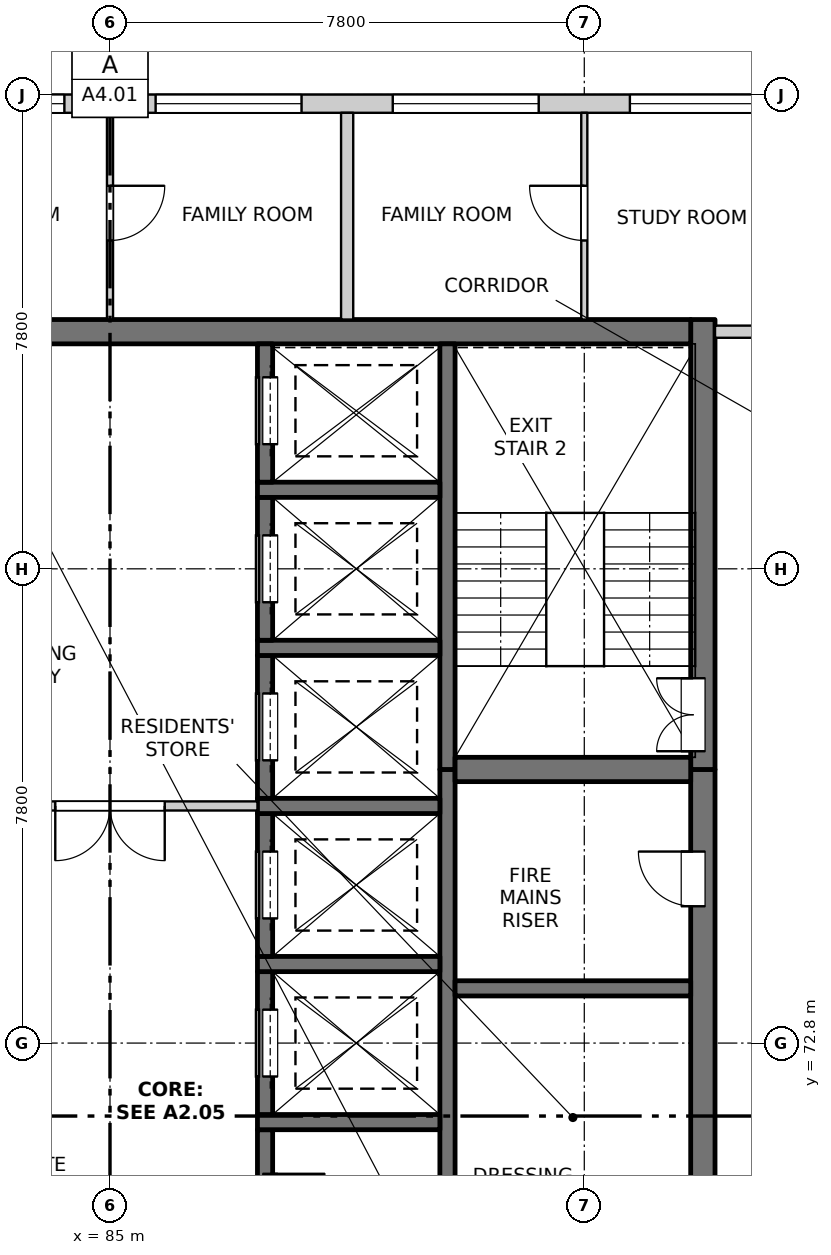
"""IFC4 building model, lengths in metres.
Left out: names, types, materials, properties, quantities, classifications, styles, units other than length and angle.
Written with IfcOpenShell. Run it as: python <this file> out.ifc"""

import sys

from ifc_helpers import new_model, si_unit, direction, frame, frame_2d, origin, place, context, subcontext, project, spatial, rectangle, extrude, element, fill, save


model = new_model("IFC4")
c1 = context("Model", 3, precision=1e-05, world=origin(), true_north=direction((0.0, 1.0)))
c2 = subcontext(c1, "Body", "Model", "MODEL_VIEW")
j1 = project(units=[si_unit("LENGTHUNIT", "METRE"), si_unit("PLANEANGLEUNIT", "RADIAN")], contexts=[c1])
p1 = place(None, origin())
s1 = spatial("IfcSite", under=j1, at=p1, CompositionType="ELEMENT")
p2 = place(p1, origin())
s2 = spatial("IfcBuilding", under=s1, at=p2, CompositionType="ELEMENT")
p3 = place(p2, frame((0.0, 0.0, 231.3)))
s3 = spatial("IfcBuildingStorey", under=s2, at=p3, CompositionType="ELEMENT", Elevation=231.3)
p4 = place(p3, frame((94.75, 61.95, -0.25), z_axis=(0.0, 0.0, 1.0), x_axis=(0.0, 1.0, 0.0)))
e1 = element("IfcWall", 1, at=p4, inside=s3, PredefinedType="SOLIDWALL", context=c2, shape_type="SweptSolid", body=[
    extrude(rectangle(XDim=15.35, YDim=0.4, at=frame_2d((7.675, 0.0))), origin(), (0.0, 0.0, 1.0), 3.4),
])
p5 = place(p4, frame((0.925, 0.0, 0.25)))
e2 = element("IfcOpeningElement", 2, at=p5, cuts=e1, PredefinedType="OPENING", context=c2, shape_type="SweptSolid", body=[
    extrude(rectangle(XDim=0.9, YDim=2.1, at=frame_2d((0.45, 1.05))), frame((0.0, 0.21, 0.0), z_axis=(0.0, -1.0, 0.0), x_axis=(1.0, 0.0, 0.0)), (0.0, 0.0, 1.0), 0.42),
])
p6 = place(p4, frame((6.8, 0.0, 0.25)))
e3 = element("IfcOpeningElement", 3, at=p6, cuts=e1, PredefinedType="OPENING", context=c2, shape_type="SweptSolid", body=[
    extrude(rectangle(XDim=0.9, YDim=2.1, at=frame_2d((0.45, 1.05))), frame((0.0, 0.21, 0.0), z_axis=(0.0, -1.0, 0.0), x_axis=(1.0, 0.0, 0.0)), (0.0, 0.0, 1.0), 0.42),
])
p7 = place(p4, frame((13.1, 0.0, 0.25)))
e4 = element("IfcOpeningElement", 4, at=p7, cuts=e1, PredefinedType="OPENING", context=c2, shape_type="SweptSolid", body=[
    extrude(rectangle(XDim=0.9, YDim=2.1, at=frame_2d((0.45, 1.05))), frame((0.0, 0.21, 0.0), z_axis=(0.0, -1.0, 0.0), x_axis=(1.0, 0.0, 0.0)), (0.0, 0.0, 1.0), 0.42),
])
p8 = place(p3, frame((94.75, 77.3, -0.25), z_axis=(0.0, 0.0, 1.0), x_axis=(0.0, 1.0, 0.0)))
e5 = element("IfcWall", 5, at=p8, inside=s3, PredefinedType="SOLIDWALL", context=c2, shape_type="SweptSolid", body=[
    extrude(rectangle(XDim=7.4, YDim=0.4, at=frame_2d((3.7, 0.0))), origin(), (0.0, 0.0, 1.0), 3.4),
])
p9 = place(p8, frame((0.3, 0.0, 0.25)))
e6 = element("IfcOpeningElement", 6, at=p9, cuts=e5, PredefinedType="OPENING", context=c2, shape_type="SweptSolid", body=[
    extrude(rectangle(XDim=1.2, YDim=2.1, at=frame_2d((0.6, 1.05))), frame((0.0, 0.21, 0.0), z_axis=(0.0, -1.0, 0.0), x_axis=(1.0, 0.0, 0.0)), (0.0, 0.0, 1.0), 0.42),
])
p10 = place(p3, frame((75.45, 84.5, -0.25), z_axis=(0.0, 0.0, 1.0), x_axis=(1.0, 0.0, 0.0)))
e7 = element("IfcWall", 7, at=p10, inside=s3, PredefinedType="SOLIDWALL", context=c2, shape_type="SweptSolid", body=[
    extrude(rectangle(XDim=19.1, YDim=0.4, at=frame_2d((9.55, 0.0))), origin(), (0.0, 0.0, 1.0), 3.4),
])
p11 = place(p3, frame((90.55, 61.95, -0.25), z_axis=(0.0, 0.0, 1.0), x_axis=(0.0, 1.0, 0.0)))
e8 = element("IfcWall", 8, at=p11, inside=s3, PredefinedType="SOLIDWALL", context=c2, shape_type="SweptSolid", body=[
    extrude(rectangle(XDim=15.35, YDim=0.25, at=frame_2d((7.675, 0.0))), origin(), (0.0, 0.0, 1.0), 3.4),
])
p12 = place(p3, frame((90.55, 77.3, -0.25), z_axis=(0.0, 0.0, 1.0), x_axis=(0.0, 1.0, 0.0)))
e9 = element("IfcWall", 9, at=p12, inside=s3, PredefinedType="SOLIDWALL", context=c2, shape_type="SweptSolid", body=[
    extrude(rectangle(XDim=7.0, YDim=0.25, at=frame_2d((3.5, 0.0))), origin(), (0.0, 0.0, 1.0), 3.4),
])
p13 = place(p3, frame((87.55, 69.025, -0.25), z_axis=(0.0, 0.0, 1.0), x_axis=(0.0, 1.0, 0.0)))
e10 = element("IfcWall", 10, at=p13, inside=s3, PredefinedType="SOLIDWALL", context=c2, shape_type="SweptSolid", body=[
    extrude(rectangle(XDim=2.35, YDim=0.25, at=frame_2d((1.175, 0.0))), origin(), (0.0, 0.0, 1.0), 3.4),
])
p14 = place(p13, frame((0.725, 0.0, 0.25)))
e11 = element("IfcOpeningElement", 11, at=p14, cuts=e10, PredefinedType="OPENING", context=c2, shape_type="SweptSolid", body=[
    extrude(rectangle(XDim=0.9, YDim=2.1, at=frame_2d((0.45, 1.05))), frame((0.0, 0.135, 0.0), z_axis=(0.0, -1.0, 0.0), x_axis=(1.0, 0.0, 0.0)), (0.0, 0.0, 1.0), 0.27),
])
p15 = place(p3, frame((87.425, 71.5, -0.25), z_axis=(0.0, 0.0, 1.0), x_axis=(1.0, 0.0, 0.0)))
e12 = element("IfcWall", 12, at=p15, inside=s3, PredefinedType="SOLIDWALL", context=c2, shape_type="SweptSolid", body=[
    extrude(rectangle(XDim=3.0, YDim=0.25, at=frame_2d((1.5, 0.0))), origin(), (0.0, 0.0, 1.0), 3.4),
])
p16 = place(p3, frame((87.55, 71.625, -0.25), z_axis=(0.0, 0.0, 1.0), x_axis=(0.0, 1.0, 0.0)))
e13 = element("IfcWall", 13, at=p16, inside=s3, PredefinedType="SOLIDWALL", context=c2, shape_type="SweptSolid", body=[
    extrude(rectangle(XDim=2.35, YDim=0.25, at=frame_2d((1.175, 0.0))), origin(), (0.0, 0.0, 1.0), 3.4),
])
p17 = place(p16, frame((0.625, 0.0, 0.25)))
e14 = element("IfcOpeningElement", 14, at=p17, cuts=e13, PredefinedType="OPENING", context=c2, shape_type="SweptSolid", body=[
    extrude(rectangle(XDim=1.1, YDim=2.1, at=frame_2d((0.55, 1.05))), frame((0.0, 0.135, 0.0), z_axis=(0.0, -1.0, 0.0), x_axis=(1.0, 0.0, 0.0)), (0.0, 0.0, 1.0), 0.27),
])
p18 = place(p3, frame((87.425, 74.1, -0.25), z_axis=(0.0, 0.0, 1.0), x_axis=(1.0, 0.0, 0.0)))
e15 = element("IfcWall", 15, at=p18, inside=s3, PredefinedType="SOLIDWALL", context=c2, shape_type="SweptSolid", body=[
    extrude(rectangle(XDim=3.0, YDim=0.25, at=frame_2d((1.5, 0.0))), origin(), (0.0, 0.0, 1.0), 3.4),
])
p19 = place(p3, frame((87.55, 74.225, -0.25), z_axis=(0.0, 0.0, 1.0), x_axis=(0.0, 1.0, 0.0)))
e16 = element("IfcWall", 16, at=p19, inside=s3, PredefinedType="SOLIDWALL", context=c2, shape_type="SweptSolid", body=[
    extrude(rectangle(XDim=2.35, YDim=0.25, at=frame_2d((1.175, 0.0))), origin(), (0.0, 0.0, 1.0), 3.4),
])
p20 = place(p19, frame((0.625, 0.0, 0.25)))
e17 = element("IfcOpeningElement", 17, at=p20, cuts=e16, PredefinedType="OPENING", context=c2, shape_type="SweptSolid", body=[
    extrude(rectangle(XDim=1.1, YDim=2.1, at=frame_2d((0.55, 1.05))), frame((0.0, 0.135, 0.0), z_axis=(0.0, -1.0, 0.0), x_axis=(1.0, 0.0, 0.0)), (0.0, 0.0, 1.0), 0.27),
])
p21 = place(p3, frame((87.425, 76.7, -0.25), z_axis=(0.0, 0.0, 1.0), x_axis=(1.0, 0.0, 0.0)))
e18 = element("IfcWall", 18, at=p21, inside=s3, PredefinedType="SOLIDWALL", context=c2, shape_type="SweptSolid", body=[
    extrude(rectangle(XDim=3.0, YDim=0.25, at=frame_2d((1.5, 0.0))), origin(), (0.0, 0.0, 1.0), 3.4),
])
p22 = place(p3, frame((87.55, 76.825, -0.25), z_axis=(0.0, 0.0, 1.0), x_axis=(0.0, 1.0, 0.0)))
e19 = element("IfcWall", 19, at=p22, inside=s3, PredefinedType="SOLIDWALL", context=c2, shape_type="SweptSolid", body=[
    extrude(rectangle(XDim=2.35, YDim=0.25, at=frame_2d((1.175, 0.0))), origin(), (0.0, 0.0, 1.0), 3.4),
])
p23 = place(p22, frame((0.625, 0.0, 0.25)))
e20 = element("IfcOpeningElement", 20, at=p23, cuts=e19, PredefinedType="OPENING", context=c2, shape_type="SweptSolid", body=[
    extrude(rectangle(XDim=1.1, YDim=2.1, at=frame_2d((0.55, 1.05))), frame((0.0, 0.135, 0.0), z_axis=(0.0, -1.0, 0.0), x_axis=(1.0, 0.0, 0.0)), (0.0, 0.0, 1.0), 0.27),
])
p24 = place(p3, frame((87.425, 79.3, -0.25), z_axis=(0.0, 0.0, 1.0), x_axis=(1.0, 0.0, 0.0)))
e21 = element("IfcWall", 21, at=p24, inside=s3, PredefinedType="SOLIDWALL", context=c2, shape_type="SweptSolid", body=[
    extrude(rectangle(XDim=3.0, YDim=0.25, at=frame_2d((1.5, 0.0))), origin(), (0.0, 0.0, 1.0), 3.4),
])
p25 = place(p3, frame((87.55, 79.425, -0.25), z_axis=(0.0, 0.0, 1.0), x_axis=(0.0, 1.0, 0.0)))
e22 = element("IfcWall", 22, at=p25, inside=s3, PredefinedType="SOLIDWALL", context=c2, shape_type="SweptSolid", body=[
    extrude(rectangle(XDim=2.35, YDim=0.25, at=frame_2d((1.175, 0.0))), origin(), (0.0, 0.0, 1.0), 3.4),
])
p26 = place(p25, frame((0.625, 0.0, 0.25)))
e23 = element("IfcOpeningElement", 23, at=p26, cuts=e22, PredefinedType="OPENING", context=c2, shape_type="SweptSolid", body=[
    extrude(rectangle(XDim=1.1, YDim=2.1, at=frame_2d((0.55, 1.05))), frame((0.0, 0.135, 0.0), z_axis=(0.0, -1.0, 0.0), x_axis=(1.0, 0.0, 0.0)), (0.0, 0.0, 1.0), 0.27),
])
p27 = place(p3, frame((87.425, 81.9, -0.25), z_axis=(0.0, 0.0, 1.0), x_axis=(1.0, 0.0, 0.0)))
e24 = element("IfcWall", 24, at=p27, inside=s3, PredefinedType="SOLIDWALL", context=c2, shape_type="SweptSolid", body=[
    extrude(rectangle(XDim=3.0, YDim=0.25, at=frame_2d((1.5, 0.0))), origin(), (0.0, 0.0, 1.0), 3.4),
])
p28 = place(p3, frame((87.55, 82.025, -0.25), z_axis=(0.0, 0.0, 1.0), x_axis=(0.0, 1.0, 0.0)))
e25 = element("IfcWall", 25, at=p28, inside=s3, PredefinedType="SOLIDWALL", context=c2, shape_type="SweptSolid", body=[
    extrude(rectangle(XDim=2.275, YDim=0.25, at=frame_2d((1.138, 0.0))), origin(), (0.0, 0.0, 1.0), 3.4),
])
p29 = place(p28, frame((0.625, 0.0, 0.25)))
e26 = element("IfcOpeningElement", 26, at=p29, cuts=e25, PredefinedType="OPENING", context=c2, shape_type="SweptSolid", body=[
    extrude(rectangle(XDim=1.1, YDim=2.1, at=frame_2d((0.55, 1.05))), frame((0.0, 0.135, 0.0), z_axis=(0.0, -1.0, 0.0), x_axis=(1.0, 0.0, 0.0)), (0.0, 0.0, 1.0), 0.27),
])
p30 = place(p3, frame((90.675, 73.7, -0.25), z_axis=(0.0, 0.0, 1.0), x_axis=(1.0, 0.0, 0.0)))
e27 = element("IfcWall", 27, at=p30, inside=s3, PredefinedType="SOLIDWALL", context=c2, shape_type="SweptSolid", body=[
    extrude(rectangle(XDim=3.875, YDim=0.25, at=frame_2d((1.938, 0.0))), origin(), (0.0, 0.0, 1.0), 3.4),
])
p31 = place(p3, frame((90.675, 77.3, -0.25), z_axis=(0.0, 0.0, 1.0), x_axis=(1.0, 0.0, 0.0)))
e28 = element("IfcWall", 28, at=p31, inside=s3, PredefinedType="SOLIDWALL", context=c2, shape_type="SweptSolid", body=[
    extrude(rectangle(XDim=3.875, YDim=0.4, at=frame_2d((1.938, 0.0))), origin(), (0.0, 0.0, 1.0), 3.4),
])
p32 = place(p3, frame((73.7, 88.25, 0.0), z_axis=(0.0, 0.0, 1.0), x_axis=(1.0, 0.0, 0.0)))
e29 = element("IfcWall", 29, at=p32, inside=s3, PredefinedType="SOLIDWALL", context=c2, shape_type="SweptSolid", body=[
    extrude(rectangle(XDim=22.6, YDim=0.3, at=frame_2d((11.3, 0.0))), origin(), (0.0, 0.0, 1.0), 2.7),
])
p33 = place(p32, frame((0.35, 0.0, 0.9)))
e30 = element("IfcOpeningElement", 30, at=p33, cuts=e29, PredefinedType="OPENING", context=c2, shape_type="SweptSolid", body=[
    extrude(rectangle(XDim=2.4, YDim=1.8, at=frame_2d((1.2, 0.9))), frame((0.0, 0.16, 0.0), z_axis=(0.0, -1.0, 0.0), x_axis=(1.0, 0.0, 0.0)), (0.0, 0.0, 1.0), 0.32),
])
p34 = place(p32, frame((4.25, 0.0, 0.9)))
e31 = element("IfcOpeningElement", 31, at=p34, cuts=e29, PredefinedType="OPENING", context=c2, shape_type="SweptSolid", body=[
    extrude(rectangle(XDim=2.4, YDim=1.8, at=frame_2d((1.2, 0.9))), frame((0.0, 0.16, 0.0), z_axis=(0.0, -1.0, 0.0), x_axis=(1.0, 0.0, 0.0)), (0.0, 0.0, 1.0), 0.32),
])
p35 = place(p32, frame((8.15, 0.0, 0.9)))
e32 = element("IfcOpeningElement", 32, at=p35, cuts=e29, PredefinedType="OPENING", context=c2, shape_type="SweptSolid", body=[
    extrude(rectangle(XDim=2.4, YDim=1.8, at=frame_2d((1.2, 0.9))), frame((0.0, 0.16, 0.0), z_axis=(0.0, -1.0, 0.0), x_axis=(1.0, 0.0, 0.0)), (0.0, 0.0, 1.0), 0.32),
])
p36 = place(p32, frame((12.05, 0.0, 0.9)))
e33 = element("IfcOpeningElement", 33, at=p36, cuts=e29, PredefinedType="OPENING", context=c2, shape_type="SweptSolid", body=[
    extrude(rectangle(XDim=2.4, YDim=1.8, at=frame_2d((1.2, 0.9))), frame((0.0, 0.16, 0.0), z_axis=(0.0, -1.0, 0.0), x_axis=(1.0, 0.0, 0.0)), (0.0, 0.0, 1.0), 0.32),
])
p37 = place(p32, frame((15.95, 0.0, 0.9)))
e34 = element("IfcOpeningElement", 34, at=p37, cuts=e29, PredefinedType="OPENING", context=c2, shape_type="SweptSolid", body=[
    extrude(rectangle(XDim=2.4, YDim=1.8, at=frame_2d((1.2, 0.9))), frame((0.0, 0.16, 0.0), z_axis=(0.0, -1.0, 0.0), x_axis=(1.0, 0.0, 0.0)), (0.0, 0.0, 1.0), 0.32),
])
p38 = place(p32, frame((19.85, 0.0, 0.9)))
e35 = element("IfcOpeningElement", 35, at=p38, cuts=e29, PredefinedType="OPENING", context=c2, shape_type="SweptSolid", body=[
    extrude(rectangle(XDim=2.4, YDim=1.8, at=frame_2d((1.2, 0.9))), frame((0.0, 0.16, 0.0), z_axis=(0.0, -1.0, 0.0), x_axis=(1.0, 0.0, 0.0)), (0.0, 0.0, 1.0), 0.32),
])
p39 = place(p3, frame((82.575, 76.7, 0.0), z_axis=(0.0, 0.0, 1.0), x_axis=(1.0, 0.0, 0.0)))
e36 = element("IfcWall", 36, at=p39, inside=s3, PredefinedType="PARTITIONING", context=c2, shape_type="SweptSolid", body=[
    extrude(rectangle(XDim=4.85, YDim=0.15, at=frame_2d((2.425, 0.0))), origin(), (0.0, 0.0, 1.0), 3.15),
])
p40 = place(p39, frame((1.525, 0.0, 0.0)))
e37 = element("IfcOpeningElement", 37, at=p40, cuts=e36, PredefinedType="OPENING", context=c2, shape_type="SweptSolid", body=[
    extrude(rectangle(XDim=1.8, YDim=2.1, at=frame_2d((0.9, 1.05))), frame((0.0, 0.085, 0.0), z_axis=(0.0, -1.0, 0.0), x_axis=(1.0, 0.0, 0.0)), (0.0, 0.0, 1.0), 0.17),
])
p41 = place(p3, frame((94.95, 84.5, 0.0), z_axis=(0.0, 0.0, 1.0), x_axis=(1.0, 0.0, 0.0)))
e38 = element("IfcWall", 38, at=p41, inside=s3, PredefinedType="PARTITIONING", context=c2, shape_type="SweptSolid", body=[
    extrude(rectangle(XDim=1.85, YDim=0.2, at=frame_2d((0.925, 0.0))), origin(), (0.0, 0.0, 1.0), 3.15),
])
p42 = place(p3, frame((85.0, 84.7, 0.0), z_axis=(0.0, 0.0, 1.0), x_axis=(0.0, 1.0, 0.0)))
e39 = element("IfcWall", 39, at=p42, inside=s3, PredefinedType="PARTITIONING", context=c2, shape_type="SweptSolid", body=[
    extrude(rectangle(XDim=3.4, YDim=0.1, at=frame_2d((1.7, 0.0))), origin(), (0.0, 0.0, 1.0), 3.15),
])
p43 = place(p42, frame((1.3, 0.0, 0.0)))
e40 = element("IfcOpeningElement", 40, at=p43, cuts=e39, PredefinedType="OPENING", context=c2, shape_type="SweptSolid", body=[
    extrude(rectangle(XDim=0.9, YDim=2.1, at=frame_2d((0.45, 1.05))), frame((0.0, 0.06, 0.0), z_axis=(0.0, -1.0, 0.0), x_axis=(1.0, 0.0, 0.0)), (0.0, 0.0, 1.0), 0.12),
])
p44 = place(p3, frame((88.9, 84.7, 0.0), z_axis=(0.0, 0.0, 1.0), x_axis=(0.0, 1.0, 0.0)))
e41 = element("IfcWall", 41, at=p44, inside=s3, PredefinedType="PARTITIONING", context=c2, shape_type="SweptSolid", body=[
    extrude(rectangle(XDim=3.4, YDim=0.2, at=frame_2d((1.7, 0.0))), origin(), (0.0, 0.0, 1.0), 3.15),
])
p45 = place(p3, frame((92.8, 84.7, 0.0), z_axis=(0.0, 0.0, 1.0), x_axis=(0.0, 1.0, 0.0)))
e42 = element("IfcWall", 42, at=p45, inside=s3, PredefinedType="PARTITIONING", context=c2, shape_type="SweptSolid", body=[
    extrude(rectangle(XDim=3.4, YDim=0.1, at=frame_2d((1.7, 0.0))), origin(), (0.0, 0.0, 1.0), 3.15),
])
p46 = place(p45, frame((1.3, 0.0, 0.0)))
e43 = element("IfcOpeningElement", 43, at=p46, cuts=e42, PredefinedType="OPENING", context=c2, shape_type="SweptSolid", body=[
    extrude(rectangle(XDim=0.9, YDim=2.1, at=frame_2d((0.45, 1.05))), frame((0.0, 0.06, 0.0), z_axis=(0.0, -1.0, 0.0), x_axis=(1.0, 0.0, 0.0)), (0.0, 0.0, 1.0), 0.12),
])
p47 = place(p35, origin())
e44 = element("IfcWindow", 44, at=p47, inside=s3, PartitioningType="DOUBLE_PANEL_VERTICAL", PredefinedType="WINDOW", context=c2, shape_type="SweptSolid", body=[
    extrude(rectangle(XDim=2.4, YDim=1.8, at=frame_2d((1.2, 0.9))), frame((0.0, 0.03, 0.0), z_axis=(0.0, -1.0, 0.0), x_axis=(1.0, 0.0, 0.0)), (0.0, 0.0, 1.0), 0.06),
])
fill(e32, e44)
p48 = place(p36, origin())
e45 = element("IfcWindow", 45, at=p48, inside=s3, PartitioningType="DOUBLE_PANEL_VERTICAL", PredefinedType="WINDOW", context=c2, shape_type="SweptSolid", body=[
    extrude(rectangle(XDim=2.4, YDim=1.8, at=frame_2d((1.2, 0.9))), frame((0.0, 0.03, 0.0), z_axis=(0.0, -1.0, 0.0), x_axis=(1.0, 0.0, 0.0)), (0.0, 0.0, 1.0), 0.06),
])
fill(e33, e45)
p49 = place(p37, origin())
e46 = element("IfcWindow", 46, at=p49, inside=s3, PartitioningType="DOUBLE_PANEL_VERTICAL", PredefinedType="WINDOW", context=c2, shape_type="SweptSolid", body=[
    extrude(rectangle(XDim=2.4, YDim=1.8, at=frame_2d((1.2, 0.9))), frame((0.0, 0.03, 0.0), z_axis=(0.0, -1.0, 0.0), x_axis=(1.0, 0.0, 0.0)), (0.0, 0.0, 1.0), 0.06),
])
fill(e34, e46)
p50 = place(p38, origin())
e47 = element("IfcWindow", 47, at=p50, inside=s3, PartitioningType="DOUBLE_PANEL_VERTICAL", PredefinedType="WINDOW", context=c2, shape_type="SweptSolid", body=[
    extrude(rectangle(XDim=2.4, YDim=1.8, at=frame_2d((1.2, 0.9))), frame((0.0, 0.03, 0.0), z_axis=(0.0, -1.0, 0.0), x_axis=(1.0, 0.0, 0.0)), (0.0, 0.0, 1.0), 0.06),
])
fill(e35, e47)
p51 = place(p14, origin())
e48 = element("IfcDoor", 48, at=p51, inside=s3, OperationType="SINGLE_SWING_LEFT", PredefinedType="DOOR", context=c2, shape_type="SweptSolid", body=[
    extrude(rectangle(XDim=0.9, YDim=2.1, at=frame_2d((0.45, 1.05))), frame((0.0, -0.06, 0.0), z_axis=(0.0, -1.0, 0.0), x_axis=(1.0, 0.0, 0.0)), (0.0, 0.0, 1.0), 0.05),
])
fill(e11, e48)
p52 = place(p17, origin())
e49 = element("IfcDoor", 49, at=p52, inside=s3, OperationType="SLIDING_TO_LEFT", PredefinedType="DOOR", context=c2, shape_type="SweptSolid", body=[
    extrude(rectangle(XDim=1.1, YDim=2.1, at=frame_2d((0.55, 1.05))), frame((0.0, -0.06, 0.0), z_axis=(0.0, -1.0, 0.0), x_axis=(1.0, 0.0, 0.0)), (0.0, 0.0, 1.0), 0.05),
])
fill(e14, e49)
p53 = place(p20, origin())
e50 = element("IfcDoor", 50, at=p53, inside=s3, OperationType="SLIDING_TO_LEFT", PredefinedType="DOOR", context=c2, shape_type="SweptSolid", body=[
    extrude(rectangle(XDim=1.1, YDim=2.1, at=frame_2d((0.55, 1.05))), frame((0.0, -0.06, 0.0), z_axis=(0.0, -1.0, 0.0), x_axis=(1.0, 0.0, 0.0)), (0.0, 0.0, 1.0), 0.05),
])
fill(e17, e50)
p54 = place(p7, origin())
e51 = element("IfcDoor", 51, at=p54, inside=s3, OperationType="SINGLE_SWING_RIGHT", PredefinedType="DOOR", context=c2, shape_type="SweptSolid", body=[
    extrude(rectangle(XDim=0.9, YDim=2.1, at=frame_2d((0.45, 1.05))), frame((0.0, 0.185, 0.0), z_axis=(0.0, -1.0, 0.0), x_axis=(1.0, 0.0, 0.0)), (0.0, 0.0, 1.0), 0.05),
])
fill(e4, e51)
p55 = place(p40, origin())
e52 = element("IfcDoor", 52, at=p55, inside=s3, OperationType="DOUBLE_DOOR_SINGLE_SWING", PredefinedType="DOOR", context=c2, shape_type="SweptSolid", body=[
    extrude(rectangle(XDim=1.8, YDim=2.1, at=frame_2d((0.9, 1.05))), frame((0.0, 0.025, 0.0), z_axis=(0.0, -1.0, 0.0), x_axis=(1.0, 0.0, 0.0)), (0.0, 0.0, 1.0), 0.05),
])
fill(e37, e52)
p56 = place(p23, origin())
e53 = element("IfcDoor", 53, at=p56, inside=s3, OperationType="SLIDING_TO_LEFT", PredefinedType="DOOR", context=c2, shape_type="SweptSolid", body=[
    extrude(rectangle(XDim=1.1, YDim=2.1, at=frame_2d((0.55, 1.05))), frame((0.0, -0.06, 0.0), z_axis=(0.0, -1.0, 0.0), x_axis=(1.0, 0.0, 0.0)), (0.0, 0.0, 1.0), 0.05),
])
fill(e20, e53)
p57 = place(p9, origin())
e54 = element("IfcDoor", 54, at=p57, inside=s3, OperationType="DOUBLE_DOOR_SINGLE_SWING", PredefinedType="DOOR", context=c2, shape_type="SweptSolid", body=[
    extrude(rectangle(XDim=1.2, YDim=2.1, at=frame_2d((0.6, 1.05))), frame((0.0, 0.185, 0.0), z_axis=(0.0, -1.0, 0.0), x_axis=(1.0, 0.0, 0.0)), (0.0, 0.0, 1.0), 0.05),
])
fill(e6, e54)
p58 = place(p26, origin())
e55 = element("IfcDoor", 55, at=p58, inside=s3, OperationType="SLIDING_TO_RIGHT", PredefinedType="DOOR", context=c2, shape_type="SweptSolid", body=[
    extrude(rectangle(XDim=1.1, YDim=2.1, at=frame_2d((0.55, 1.05))), frame((0.0, -0.06, 0.0), z_axis=(0.0, -1.0, 0.0), x_axis=(1.0, 0.0, 0.0)), (0.0, 0.0, 1.0), 0.05),
])
fill(e23, e55)
p59 = place(p29, origin())
e56 = element("IfcDoor", 56, at=p59, inside=s3, OperationType="SLIDING_TO_RIGHT", PredefinedType="DOOR", context=c2, shape_type="SweptSolid", body=[
    extrude(rectangle(XDim=1.1, YDim=2.1, at=frame_2d((0.55, 1.05))), frame((0.0, -0.06, 0.0), z_axis=(0.0, -1.0, 0.0), x_axis=(1.0, 0.0, 0.0)), (0.0, 0.0, 1.0), 0.05),
])
fill(e26, e56)
p60 = place(p43, origin())
e57 = element("IfcDoor", 57, at=p60, inside=s3, OperationType="SINGLE_SWING_LEFT", PredefinedType="DOOR", context=c2, shape_type="SweptSolid", body=[
    extrude(rectangle(XDim=0.9, YDim=2.1, at=frame_2d((0.45, 1.05))), frame((0.0, 0.025, 0.0), z_axis=(0.0, -1.0, 0.0), x_axis=(1.0, 0.0, 0.0)), (0.0, 0.0, 1.0), 0.05),
])
fill(e40, e57)
p61 = place(p46, origin())
e58 = element("IfcDoor", 58, at=p61, inside=s3, OperationType="SINGLE_SWING_RIGHT", PredefinedType="DOOR", context=c2, shape_type="SweptSolid", body=[
    extrude(rectangle(XDim=0.9, YDim=2.1, at=frame_2d((0.45, 1.05))), frame((0.0, 0.025, 0.0), z_axis=(0.0, -1.0, 0.0), x_axis=(1.0, 0.0, 0.0)), (0.0, 0.0, 1.0), 0.05),
])
fill(e43, e58)
save(model, sys.argv[1])
